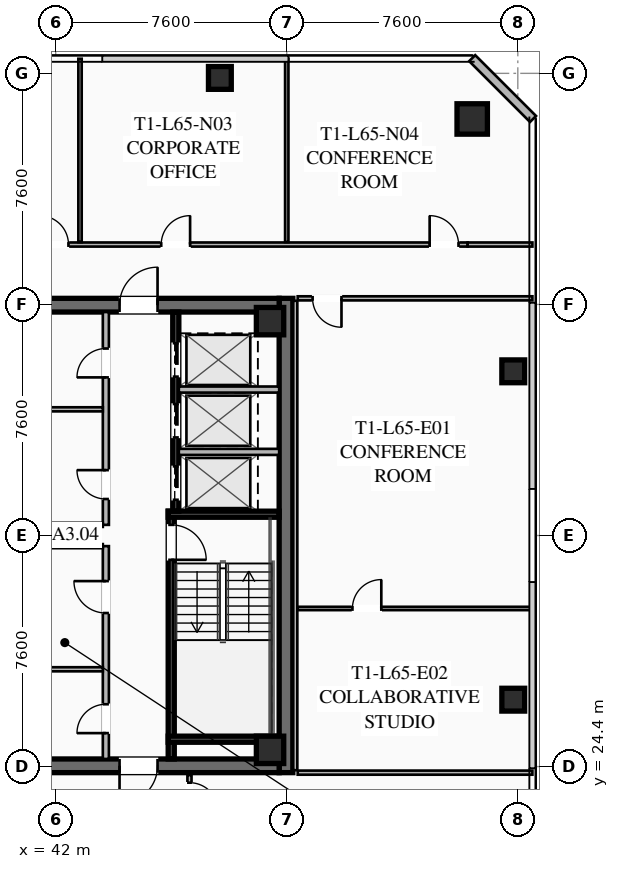
"""IFC4 building model, lengths in metres.
Left out: names, types, materials, properties, quantities, classifications, styles, units other than length and angle.
Written with IfcOpenShell. Run it as: python <this file> out.ifc"""

import sys

from ifc_helpers import new_model, si_unit, direction, frame, frame_2d, origin, origin_2d, place, context, subcontext, project, spatial, rectangle, hollow_rectangle, extrude, element, fill, save


model = new_model("IFC4")
c1 = context("Model", 3, precision=1e-05, world=origin(), true_north=direction((0.0, 1.0)))
c2 = subcontext(c1, "Body", "Model", "MODEL_VIEW")
j1 = project(units=[si_unit("LENGTHUNIT", "METRE"), si_unit("PLANEANGLEUNIT", "RADIAN")], contexts=[c1])
p1 = place(None, origin())
s1 = spatial("IfcSite", under=j1, at=p1, CompositionType="ELEMENT")
p2 = place(p1, origin())
s2 = spatial("IfcBuilding", under=s1, at=p2, CompositionType="ELEMENT")
p3 = place(p2, frame((0.0, 0.0, 239.7)))
s3 = spatial("IfcBuildingStorey", under=s2, at=p3, CompositionType="ELEMENT", Elevation=239.7)
p4 = place(p3, frame((49.575, 39.8, 0.0), z_axis=(0.0, 0.0, 1.0), x_axis=(0.0, -1.0, 0.0)))
e1 = element("IfcWall", 1, at=p4, inside=s3, PredefinedType="SHEAR", context=c2, shape_type="SweptSolid", body=[
    extrude(rectangle(XDim=15.6, YDim=0.45, at=frame_2d((7.8, 0.0))), origin(), (0.0, 0.0, 1.0), 3.55),
])
p5 = place(p3, frame((49.35, 24.425, 0.0), z_axis=(0.0, 0.0, 1.0), x_axis=(-1.0, 0.0, 0.0)))
e2 = element("IfcWall", 2, at=p5, inside=s3, PredefinedType="SHEAR", context=c2, shape_type="SweptSolid", body=[
    extrude(rectangle(XDim=14.7, YDim=0.45, at=frame_2d((7.35, 0.0))), origin(), (0.0, 0.0, 1.0), 3.55),
])
p6 = place(p5, frame((9.05, 0.0, 0.0)))
e3 = element("IfcOpeningElement", 3, at=p6, cuts=e2, PredefinedType="OPENING", context=c2, shape_type="SweptSolid", body=[
    extrude(rectangle(XDim=1.25, YDim=2.25, at=frame_2d((0.625, 1.125))), frame((0.0, 0.235, 0.0), z_axis=(0.0, -1.0, 0.0), x_axis=(1.0, 0.0, 0.0)), (0.0, 0.0, 1.0), 0.47),
])
p7 = place(p5, frame((4.0, 0.0, 0.0)))
e4 = element("IfcOpeningElement", 4, at=p7, cuts=e2, PredefinedType="OPENING", context=c2, shape_type="SweptSolid", body=[
    extrude(rectangle(XDim=1.25, YDim=2.25, at=frame_2d((0.625, 1.125))), frame((0.0, 0.235, 0.0), z_axis=(0.0, -1.0, 0.0), x_axis=(1.0, 0.0, 0.0)), (0.0, 0.0, 1.0), 0.47),
])
p8 = place(p3, frame((34.65, 39.575, 0.0), z_axis=(0.0, 0.0, 1.0), x_axis=(1.0, 0.0, 0.0)))
e5 = element("IfcWall", 5, at=p8, inside=s3, PredefinedType="SHEAR", context=c2, shape_type="SweptSolid", body=[
    extrude(rectangle(XDim=14.7, YDim=0.45, at=frame_2d((7.35, 0.0))), origin(), (0.0, 0.0, 1.0), 3.55),
])
p9 = place(p8, frame((4.4, 0.0, 0.0)))
e6 = element("IfcOpeningElement", 6, at=p9, cuts=e5, PredefinedType="OPENING", context=c2, shape_type="SweptSolid", body=[
    extrude(rectangle(XDim=1.25, YDim=2.25, at=frame_2d((0.625, 1.125))), frame((0.0, 0.235, 0.0), z_axis=(0.0, -1.0, 0.0), x_axis=(1.0, 0.0, 0.0)), (0.0, 0.0, 1.0), 0.47),
])
p10 = place(p8, frame((9.45, 0.0, 0.0)))
e7 = element("IfcOpeningElement", 7, at=p10, cuts=e5, PredefinedType="OPENING", context=c2, shape_type="SweptSolid", body=[
    extrude(rectangle(XDim=1.25, YDim=2.25, at=frame_2d((0.625, 1.125))), frame((0.0, 0.235, 0.0), z_axis=(0.0, -1.0, 0.0), x_axis=(1.0, 0.0, 0.0)), (0.0, 0.0, 1.0), 0.47),
])
for number, where, z_axis, x_axis in (
    (8, (49.05, 24.95, 0.0), (0.0, 0.0, 1.0), (1.0, 0.0, 0.0)),
    (9, (49.05, 39.05, 0.0), (0.0, 0.0, 1.0), (1.0, 0.0, 0.0)),
):
    element("IfcColumn", number, at=place(p3, frame(where, z_axis=z_axis, x_axis=x_axis)), inside=s3, PredefinedType="COLUMN", context=c2, shape_type="SweptSolid", body=[
        extrude(hollow_rectangle(XDim=0.9, YDim=0.9, WallThickness=0.04, at=origin_2d()), origin(), (0.0, 0.0, 1.0), 3.37),
    ])
p11 = place(p3, frame((55.7, 45.7, 0.0), z_axis=(0.0, 0.0, 1.0), x_axis=(1.0, 0.0, 0.0)))
e10 = element("IfcColumn", 10, at=p11, inside=s3, PredefinedType="COLUMN", context=c2, shape_type="SweptSolid", body=[
    extrude(hollow_rectangle(XDim=1.0, YDim=1.0, WallThickness=0.04, at=origin_2d()), origin(), (0.0, 0.0, 1.0), 3.37),
])
for number, where, z_axis, x_axis in (
    (11, (57.05, 26.6, 0.0), (0.0, 0.0, 1.0), (1.0, 0.0, 0.0)),
    (12, (57.05, 37.4, 0.0), (0.0, 0.0, 1.0), (1.0, 0.0, 0.0)),
    (13, (47.4, 47.05, 0.0), (0.0, 0.0, 1.0), (1.0, 0.0, 0.0)),
):
    element("IfcColumn", number, at=place(p3, frame(where, z_axis=z_axis, x_axis=x_axis)), inside=s3, PredefinedType="COLUMN", context=c2, shape_type="SweptSolid", body=[
        extrude(hollow_rectangle(XDim=0.75, YDim=0.75, WallThickness=0.032, at=origin_2d()), origin(), (0.0, 0.0, 1.0), 3.37),
    ])
p12 = place(p3, frame((55.7, 47.7, 0.0), z_axis=(0.0, 0.0, 1.0), x_axis=(0.707106781187, -0.707106781187, 0.0)))
e14 = element("IfcWall", 14, at=p12, inside=s3, PredefinedType="SOLIDWALL", context=c2, shape_type="SweptSolid", body=[
    extrude(rectangle(XDim=2.828, YDim=0.28, at=frame_2d((1.414, 0.0))), origin(), (0.0, 0.0, 1.0), 3.37),
])
p13 = place(p3, frame((45.8, 32.8, 0.0), z_axis=(0.0, 0.0, 1.0), x_axis=(0.0, -1.0, 0.0)))
e15 = element("IfcWall", 15, at=p13, inside=s3, PredefinedType="SHEAR", context=c2, shape_type="SweptSolid", body=[
    extrude(rectangle(XDim=8.15, YDim=0.2, at=frame_2d((4.075, 0.0))), origin(), (0.0, 0.0, 1.0), 3.37),
])
p14 = place(p13, frame((0.45, 0.0, 0.0)))
e16 = element("IfcOpeningElement", 16, at=p14, cuts=e15, PredefinedType="OPENING", context=c2, shape_type="SweptSolid", body=[
    extrude(rectangle(XDim=1.15, YDim=2.2, at=frame_2d((0.575, 1.1))), frame((0.0, 0.11, 0.0), z_axis=(0.0, -1.0, 0.0), x_axis=(1.0, 0.0, 0.0)), (0.0, 0.0, 1.0), 0.22),
])
for number, where, z_axis, x_axis in (
    (17, (45.7, 32.7, 0.0), (0.0, 0.0, 1.0), (1.0, 0.0, 0.0)),
    (18, (45.7, 25.3, 0.0), (0.0, 0.0, 1.0), (1.0, 0.0, 0.0)),
):
    element("IfcWall", number, at=place(p3, frame(where, z_axis=z_axis, x_axis=x_axis)), inside=s3, PredefinedType="SHEAR", context=c2, shape_type="SweptSolid", body=[
        extrude(rectangle(XDim=3.65, YDim=0.2, at=frame_2d((1.825, 0.0))), origin(), (0.0, 0.0, 1.0), 3.37),
    ])
p15 = place(p3, frame((45.95, 39.35, 0.0), z_axis=(0.0, 0.0, 1.0), x_axis=(0.0, -1.0, 0.0)))
e19 = element("IfcWall", 19, at=p15, inside=s3, PredefinedType="SHEAR", context=c2, shape_type="SweptSolid", body=[
    extrude(rectangle(XDim=6.55, YDim=0.2, at=frame_2d((3.275, 0.0))), origin(), (0.0, 0.0, 1.0), 3.37),
])
p16 = place(p15, frame((5.075, 0.0, 0.0)))
e20 = element("IfcOpeningElement", 20, at=p16, cuts=e19, PredefinedType="OPENING", context=c2, shape_type="SweptSolid", body=[
    extrude(rectangle(XDim=1.1, YDim=2.2, at=frame_2d((0.55, 1.1))), frame((0.0, 0.11, 0.0), z_axis=(0.0, -1.0, 0.0), x_axis=(1.0, 0.0, 0.0)), (0.0, 0.0, 1.0), 0.22),
])
p17 = place(p15, frame((3.025, 0.0, 0.0)))
e21 = element("IfcOpeningElement", 21, at=p17, cuts=e19, PredefinedType="OPENING", context=c2, shape_type="SweptSolid", body=[
    extrude(rectangle(XDim=1.1, YDim=2.2, at=frame_2d((0.55, 1.1))), frame((0.0, 0.11, 0.0), z_axis=(0.0, -1.0, 0.0), x_axis=(1.0, 0.0, 0.0)), (0.0, 0.0, 1.0), 0.22),
])
p18 = place(p15, frame((1.025, 0.0, 0.0)))
e22 = element("IfcOpeningElement", 22, at=p18, cuts=e19, PredefinedType="OPENING", context=c2, shape_type="SweptSolid", body=[
    extrude(rectangle(XDim=1.1, YDim=2.2, at=frame_2d((0.55, 1.1))), frame((0.0, 0.11, 0.0), z_axis=(0.0, -1.0, 0.0), x_axis=(1.0, 0.0, 0.0)), (0.0, 0.0, 1.0), 0.22),
])
for number, where, z_axis, x_axis in (
    (23, (46.05, 34.75, 0.0), (0.0, 0.0, 1.0), (1.0, 0.0, 0.0)),
    (24, (46.05, 36.8, 0.0), (0.0, 0.0, 1.0), (1.0, 0.0, 0.0)),
):
    element("IfcWall", number, at=place(p3, frame(where, z_axis=z_axis, x_axis=x_axis)), inside=s3, PredefinedType="SOLIDWALL", context=c2, shape_type="SweptSolid", body=[
        extrude(rectangle(XDim=3.3, YDim=0.2, at=frame_2d((1.65, 0.0))), origin(), (0.0, 0.0, 1.0), 3.37),
    ])
p19 = place(p3, frame((43.65, 24.65, 0.0), z_axis=(0.0, 0.0, 1.0), x_axis=(0.0, 1.0, 0.0)))
e25 = element("IfcWall", 25, at=p19, inside=s3, PredefinedType="SOLIDWALL", context=c2, shape_type="SweptSolid", body=[
    extrude(rectangle(XDim=7.0, YDim=0.2, at=frame_2d((3.5, 0.0))), origin(), (0.0, 0.0, 1.0), 2.723),
])
p20 = place(p19, frame((0.85, 0.0, 0.0)))
e26 = element("IfcOpeningElement", 26, at=p20, cuts=e25, PredefinedType="OPENING", context=c2, shape_type="SweptSolid", body=[
    extrude(rectangle(XDim=0.95, YDim=2.05, at=frame_2d((0.475, 1.025))), frame((0.0, 0.11, 0.0), z_axis=(0.0, -1.0, 0.0), x_axis=(1.0, 0.0, 0.0)), (0.0, 0.0, 1.0), 0.22),
])
p21 = place(p19, frame((4.8, 0.0, 0.0)))
e27 = element("IfcOpeningElement", 27, at=p21, cuts=e25, PredefinedType="OPENING", context=c2, shape_type="SweptSolid", body=[
    extrude(rectangle(XDim=1.05, YDim=2.2, at=frame_2d((0.525, 1.1))), frame((0.0, 0.11, 0.0), z_axis=(0.0, -1.0, 0.0), x_axis=(1.0, 0.0, 0.0)), (0.0, 0.0, 1.0), 0.22),
])
for number, where, z_axis, x_axis in (
    (28, (41.67, 31.65, 0.0), (0.0, 0.0, 1.0), (1.0, 0.0, 0.0)),
    (29, (41.67, 27.6, 0.0), (0.0, 0.0, 1.0), (1.0, 0.0, 0.0)),
):
    element("IfcWall", number, at=place(p3, frame(where, z_axis=z_axis, x_axis=x_axis)), inside=s3, PredefinedType="PARTITIONING", context=c2, shape_type="SweptSolid", body=[
        extrude(rectangle(XDim=1.88, YDim=0.135, at=frame_2d((0.94, 0.0))), origin(), (0.0, 0.0, 1.0), 2.723),
    ])
p22 = place(p3, frame((43.65, 32.35, 0.0), z_axis=(0.0, 0.0, 1.0), x_axis=(0.0, 1.0, 0.0)))
e30 = element("IfcWall", 30, at=p22, inside=s3, PredefinedType="SOLIDWALL", context=c2, shape_type="SweptSolid", body=[
    extrude(rectangle(XDim=7.0, YDim=0.2, at=frame_2d((3.5, 0.0))), origin(), (0.0, 0.0, 1.0), 2.723),
])
p23 = place(p22, frame((0.85, 0.0, 0.0)))
e31 = element("IfcOpeningElement", 31, at=p23, cuts=e30, PredefinedType="OPENING", context=c2, shape_type="SweptSolid", body=[
    extrude(rectangle(XDim=0.95, YDim=2.05, at=frame_2d((0.475, 1.025))), frame((0.0, 0.11, 0.0), z_axis=(0.0, -1.0, 0.0), x_axis=(1.0, 0.0, 0.0)), (0.0, 0.0, 1.0), 0.22),
])
p24 = place(p22, frame((4.85, 0.0, 0.0)))
e32 = element("IfcOpeningElement", 32, at=p24, cuts=e30, PredefinedType="OPENING", context=c2, shape_type="SweptSolid", body=[
    extrude(rectangle(XDim=0.95, YDim=2.05, at=frame_2d((0.475, 1.025))), frame((0.0, 0.11, 0.0), z_axis=(0.0, -1.0, 0.0), x_axis=(1.0, 0.0, 0.0)), (0.0, 0.0, 1.0), 0.22),
])
for number, where, z_axis, x_axis in (
    (33, (41.67, 32.35, 0.0), (0.0, 0.0, 1.0), (1.0, 0.0, 0.0)),
    (34, (41.67, 36.15, 0.0), (0.0, 0.0, 1.0), (1.0, 0.0, 0.0)),
):
    element("IfcWall", number, at=place(p3, frame(where, z_axis=z_axis, x_axis=x_axis)), inside=s3, PredefinedType="PARTITIONING", context=c2, shape_type="SweptSolid", body=[
        extrude(rectangle(XDim=1.88, YDim=0.135, at=frame_2d((0.94, 0.0))), origin(), (0.0, 0.0, 1.0), 2.723),
    ])
p25 = place(p3, frame((28.45, 41.57, 0.0), z_axis=(0.0, 0.0, 1.0), x_axis=(1.0, 0.0, 0.0)))
e35 = element("IfcWall", 35, at=p25, inside=s3, PredefinedType="PARTITIONING", context=c2, shape_type="SweptSolid", body=[
    extrude(rectangle(XDim=27.1, YDim=0.135, at=frame_2d((13.55, 0.0))), origin(), (0.0, 0.0, 1.0), 2.723),
])
p26 = place(p25, frame((0.3, 0.0, 0.0)))
e36 = element("IfcOpeningElement", 36, at=p26, cuts=e35, PredefinedType="OPENING", context=c2, shape_type="SweptSolid", body=[
    extrude(rectangle(XDim=0.95, YDim=2.05, at=frame_2d((0.475, 1.025))), frame((0.0, 0.077, 0.0), z_axis=(0.0, -1.0, 0.0), x_axis=(1.0, 0.0, 0.0)), (0.0, 0.0, 1.0), 0.155),
])
p27 = place(p25, frame((13.02, 0.0, 0.0)))
e37 = element("IfcOpeningElement", 37, at=p27, cuts=e35, PredefinedType="OPENING", context=c2, shape_type="SweptSolid", body=[
    extrude(rectangle(XDim=0.95, YDim=2.05, at=frame_2d((0.475, 1.025))), frame((0.0, 0.077, 0.0), z_axis=(0.0, -1.0, 0.0), x_axis=(1.0, 0.0, 0.0)), (0.0, 0.0, 1.0), 0.155),
])
p28 = place(p25, frame((17.021, 0.0, 0.0)))
e38 = element("IfcOpeningElement", 38, at=p28, cuts=e35, PredefinedType="OPENING", context=c2, shape_type="SweptSolid", body=[
    extrude(rectangle(XDim=0.95, YDim=2.05, at=frame_2d((0.475, 1.025))), frame((0.0, 0.077, 0.0), z_axis=(0.0, -1.0, 0.0), x_axis=(1.0, 0.0, 0.0)), (0.0, 0.0, 1.0), 0.155),
])
p29 = place(p25, frame((25.85, 0.0, 0.0)))
e39 = element("IfcOpeningElement", 39, at=p29, cuts=e35, PredefinedType="OPENING", context=c2, shape_type="SweptSolid", body=[
    extrude(rectangle(XDim=0.95, YDim=2.05, at=frame_2d((0.475, 1.025))), frame((0.0, 0.077, 0.0), z_axis=(0.0, -1.0, 0.0), x_axis=(1.0, 0.0, 0.0)), (0.0, 0.0, 1.0), 0.155),
])
p30 = place(p3, frame((55.55, 41.57, 0.0), z_axis=(0.0, 0.0, 1.0), x_axis=(1.0, 0.0, 0.0)))
e40 = element("IfcWall", 40, at=p30, inside=s3, PredefinedType="PARTITIONING", context=c2, shape_type="SweptSolid", body=[
    extrude(rectangle(XDim=2.13, YDim=0.135, at=frame_2d((1.065, 0.0))), origin(), (0.0, 0.0, 1.0), 2.723),
])
for number, where, z_axis, x_axis in (
    (41, (42.8, 41.65, 0.0), (0.0, 0.0, 1.0), (0.0, 1.0, 0.0)),
    (42, (49.6, 41.65, 0.0), (0.0, 0.0, 1.0), (0.0, 1.0, 0.0)),
):
    element("IfcWall", number, at=place(p3, frame(where, z_axis=z_axis, x_axis=x_axis)), inside=s3, PredefinedType="PARTITIONING", context=c2, shape_type="SweptSolid", body=[
        extrude(rectangle(XDim=6.03, YDim=0.11, at=frame_2d((3.015, 0.0))), origin(), (0.0, 0.0, 1.0), 2.723),
    ])
p31 = place(p3, frame((46.4, 24.12, 0.0), z_axis=(0.0, 0.0, 1.0), x_axis=(0.0, -1.0, 0.0)))
e43 = element("IfcWall", 43, at=p31, inside=s3, PredefinedType="PARTITIONING", context=c2, shape_type="SweptSolid", body=[
    extrude(rectangle(XDim=2.24, YDim=0.135, at=frame_2d((1.12, 0.0))), origin(), (0.0, 0.0, 1.0), 2.723),
])
p32 = place(p31, frame((0.25, 0.0, 0.0)))
e44 = element("IfcOpeningElement", 44, at=p32, cuts=e43, PredefinedType="OPENING", context=c2, shape_type="SweptSolid", body=[
    extrude(rectangle(XDim=0.95, YDim=2.05, at=frame_2d((0.475, 1.025))), frame((0.0, 0.077, 0.0), z_axis=(0.0, -1.0, 0.0), x_axis=(1.0, 0.0, 0.0)), (0.0, 0.0, 1.0), 0.155),
])
p33 = place(p3, frame((49.88, 39.72, 0.0), z_axis=(0.0, 0.0, 1.0), x_axis=(0.0, -1.0, 0.0)))
e45 = element("IfcWall", 45, at=p33, inside=s3, PredefinedType="PARTITIONING", context=c2, shape_type="SweptSolid", body=[
    extrude(rectangle(XDim=15.44, YDim=0.135, at=frame_2d((7.72, 0.0))), origin(), (0.0, 0.0, 1.0), 2.723),
])
p34 = place(p3, frame((57.68, 39.8, 0.0), z_axis=(0.0, 0.0, 1.0), x_axis=(-1.0, 0.0, 0.0)))
e46 = element("IfcWall", 46, at=p34, inside=s3, PredefinedType="PARTITIONING", context=c2, shape_type="SweptSolid", body=[
    extrude(rectangle(XDim=7.72, YDim=0.135, at=frame_2d((3.86, 0.0))), origin(), (0.0, 0.0, 1.0), 2.723),
])
p35 = place(p34, frame((6.28, 0.0, 0.0)))
e47 = element("IfcOpeningElement", 47, at=p35, cuts=e46, PredefinedType="OPENING", context=c2, shape_type="SweptSolid", body=[
    extrude(rectangle(XDim=0.95, YDim=2.05, at=frame_2d((0.475, 1.025))), frame((0.0, 0.077, 0.0), z_axis=(0.0, -1.0, 0.0), x_axis=(1.0, 0.0, 0.0)), (0.0, 0.0, 1.0), 0.155),
])
p36 = place(p3, frame((49.96, 24.2, 0.0), z_axis=(0.0, 0.0, 1.0), x_axis=(1.0, 0.0, 0.0)))
e48 = element("IfcWall", 48, at=p36, inside=s3, PredefinedType="PARTITIONING", context=c2, shape_type="SweptSolid", body=[
    extrude(rectangle(XDim=7.72, YDim=0.135, at=frame_2d((3.86, 0.0))), origin(), (0.0, 0.0, 1.0), 2.723),
])
p37 = place(p3, frame((49.96, 29.6, 0.0), z_axis=(0.0, 0.0, 1.0), x_axis=(1.0, 0.0, 0.0)))
e49 = element("IfcWall", 49, at=p37, inside=s3, PredefinedType="PARTITIONING", context=c2, shape_type="SweptSolid", body=[
    extrude(rectangle(XDim=7.72, YDim=0.11, at=frame_2d((3.86, 0.0))), origin(), (0.0, 0.0, 1.0), 2.723),
])
p38 = place(p37, frame((1.8, 0.0, 0.0)))
e50 = element("IfcOpeningElement", 50, at=p38, cuts=e49, PredefinedType="OPENING", context=c2, shape_type="SweptSolid", body=[
    extrude(rectangle(XDim=0.95, YDim=2.05, at=frame_2d((0.475, 1.025))), frame((0.0, 0.065, 0.0), z_axis=(0.0, -1.0, 0.0), x_axis=(1.0, 0.0, 0.0)), (0.0, 0.0, 1.0), 0.13),
])
p39 = place(p10, origin())
e51 = element("IfcDoor", 51, at=p39, inside=s3, OperationType="SINGLE_SWING_RIGHT", PredefinedType="DOOR", context=c2, shape_type="SweptSolid", body=[
    extrude(rectangle(XDim=1.25, YDim=2.25, at=frame_2d((0.625, 1.125))), frame((0.0, 0.025, 0.0), z_axis=(0.0, -1.0, 0.0), x_axis=(1.0, 0.0, 0.0)), (0.0, 0.0, 1.0), 0.05),
])
fill(e7, e51)
p40 = place(p7, origin())
e52 = element("IfcDoor", 52, at=p40, inside=s3, OperationType="SINGLE_SWING_RIGHT", PredefinedType="DOOR", context=c2, shape_type="SweptSolid", body=[
    extrude(rectangle(XDim=1.25, YDim=2.25, at=frame_2d((0.625, 1.125))), frame((0.0, 0.025, 0.0), z_axis=(0.0, -1.0, 0.0), x_axis=(1.0, 0.0, 0.0)), (0.0, 0.0, 1.0), 0.05),
])
fill(e4, e52)
p41 = place(p14, origin())
e53 = element("IfcDoor", 53, at=p41, inside=s3, OperationType="SINGLE_SWING_RIGHT", PredefinedType="DOOR", context=c2, shape_type="SweptSolid", body=[
    extrude(rectangle(XDim=1.15, YDim=2.2, at=frame_2d((0.575, 1.1))), frame((0.0, 0.025, 0.0), z_axis=(0.0, -1.0, 0.0), x_axis=(1.0, 0.0, 0.0)), (0.0, 0.0, 1.0), 0.05),
])
fill(e16, e53)
p42 = place(p20, origin())
e54 = element("IfcDoor", 54, at=p42, inside=s3, OperationType="SINGLE_SWING_LEFT", PredefinedType="DOOR", context=c2, shape_type="SweptSolid", body=[
    extrude(rectangle(XDim=0.95, YDim=2.05, at=frame_2d((0.475, 1.025))), frame((0.0, 0.025, 0.0), z_axis=(0.0, -1.0, 0.0), x_axis=(1.0, 0.0, 0.0)), (0.0, 0.0, 1.0), 0.05),
])
fill(e26, e54)
p43 = place(p21, origin())
e55 = element("IfcDoor", 55, at=p43, inside=s3, OperationType="SINGLE_SWING_RIGHT", PredefinedType="DOOR", context=c2, shape_type="SweptSolid", body=[
    extrude(rectangle(XDim=1.05, YDim=2.2, at=frame_2d((0.525, 1.1))), frame((0.0, 0.025, 0.0), z_axis=(0.0, -1.0, 0.0), x_axis=(1.0, 0.0, 0.0)), (0.0, 0.0, 1.0), 0.05),
])
fill(e27, e55)
p44 = place(p23, origin())
e56 = element("IfcDoor", 56, at=p44, inside=s3, OperationType="SINGLE_SWING_RIGHT", PredefinedType="DOOR", context=c2, shape_type="SweptSolid", body=[
    extrude(rectangle(XDim=0.95, YDim=2.05, at=frame_2d((0.475, 1.025))), frame((0.0, 0.025, 0.0), z_axis=(0.0, -1.0, 0.0), x_axis=(1.0, 0.0, 0.0)), (0.0, 0.0, 1.0), 0.05),
])
fill(e31, e56)
p45 = place(p24, origin())
e57 = element("IfcDoor", 57, at=p45, inside=s3, OperationType="SINGLE_SWING_LEFT", PredefinedType="DOOR", context=c2, shape_type="SweptSolid", body=[
    extrude(rectangle(XDim=0.95, YDim=2.05, at=frame_2d((0.475, 1.025))), frame((0.0, 0.025, 0.0), z_axis=(0.0, -1.0, 0.0), x_axis=(1.0, 0.0, 0.0)), (0.0, 0.0, 1.0), 0.05),
])
fill(e32, e57)
p46 = place(p27, origin())
e58 = element("IfcDoor", 58, at=p46, inside=s3, OperationType="SINGLE_SWING_LEFT", PredefinedType="DOOR", context=c2, shape_type="SweptSolid", body=[
    extrude(rectangle(XDim=0.95, YDim=2.05, at=frame_2d((0.475, 1.025))), frame((0.0, 0.025, 0.0), z_axis=(0.0, -1.0, 0.0), x_axis=(1.0, 0.0, 0.0)), (0.0, 0.0, 1.0), 0.05),
])
fill(e37, e58)
p47 = place(p28, origin())
e59 = element("IfcDoor", 59, at=p47, inside=s3, OperationType="SINGLE_SWING_RIGHT", PredefinedType="DOOR", context=c2, shape_type="SweptSolid", body=[
    extrude(rectangle(XDim=0.95, YDim=2.05, at=frame_2d((0.475, 1.025))), frame((0.0, 0.025, 0.0), z_axis=(0.0, -1.0, 0.0), x_axis=(1.0, 0.0, 0.0)), (0.0, 0.0, 1.0), 0.05),
])
fill(e38, e59)
p48 = place(p29, origin())
e60 = element("IfcDoor", 60, at=p48, inside=s3, OperationType="SINGLE_SWING_LEFT", PredefinedType="DOOR", context=c2, shape_type="SweptSolid", body=[
    extrude(rectangle(XDim=0.95, YDim=2.05, at=frame_2d((0.475, 1.025))), frame((0.0, 0.025, 0.0), z_axis=(0.0, -1.0, 0.0), x_axis=(1.0, 0.0, 0.0)), (0.0, 0.0, 1.0), 0.05),
])
fill(e39, e60)
p49 = place(p32, origin())
e61 = element("IfcDoor", 61, at=p49, inside=s3, OperationType="SINGLE_SWING_RIGHT", PredefinedType="DOOR", context=c2, shape_type="SweptSolid", body=[
    extrude(rectangle(XDim=0.95, YDim=2.05, at=frame_2d((0.475, 1.025))), frame((0.0, 0.025, 0.0), z_axis=(0.0, -1.0, 0.0), x_axis=(1.0, 0.0, 0.0)), (0.0, 0.0, 1.0), 0.05),
])
fill(e44, e61)
p50 = place(p35, origin())
e62 = element("IfcDoor", 62, at=p50, inside=s3, OperationType="SINGLE_SWING_LEFT", PredefinedType="DOOR", context=c2, shape_type="SweptSolid", body=[
    extrude(rectangle(XDim=0.95, YDim=2.05, at=frame_2d((0.475, 1.025))), frame((0.0, 0.025, 0.0), z_axis=(0.0, -1.0, 0.0), x_axis=(1.0, 0.0, 0.0)), (0.0, 0.0, 1.0), 0.05),
])
fill(e47, e62)
p51 = place(p38, origin())
e63 = element("IfcDoor", 63, at=p51, inside=s3, OperationType="SINGLE_SWING_RIGHT", PredefinedType="DOOR", context=c2, shape_type="SweptSolid", body=[
    extrude(rectangle(XDim=0.95, YDim=2.05, at=frame_2d((0.475, 1.025))), frame((0.0, 0.025, 0.0), z_axis=(0.0, -1.0, 0.0), x_axis=(1.0, 0.0, 0.0)), (0.0, 0.0, 1.0), 0.05),
])
fill(e50, e63)
p52 = place(p16, origin())
e64 = element("IfcDoor", 64, at=p52, inside=s3, OperationType="SLIDING_TO_LEFT", PredefinedType="DOOR", context=c2, shape_type="SweptSolid", body=[
    extrude(rectangle(XDim=1.1, YDim=2.2, at=frame_2d((0.55, 1.1))), frame((0.0, 0.025, 0.0), z_axis=(0.0, -1.0, 0.0), x_axis=(1.0, 0.0, 0.0)), (0.0, 0.0, 1.0), 0.05),
])
fill(e20, e64)
p53 = place(p17, origin())
e65 = element("IfcDoor", 65, at=p53, inside=s3, OperationType="SLIDING_TO_LEFT", PredefinedType="DOOR", context=c2, shape_type="SweptSolid", body=[
    extrude(rectangle(XDim=1.1, YDim=2.2, at=frame_2d((0.55, 1.1))), frame((0.0, 0.025, 0.0), z_axis=(0.0, -1.0, 0.0), x_axis=(1.0, 0.0, 0.0)), (0.0, 0.0, 1.0), 0.05),
])
fill(e21, e65)
p54 = place(p18, origin())
e66 = element("IfcDoor", 66, at=p54, inside=s3, OperationType="SLIDING_TO_LEFT", PredefinedType="DOOR", context=c2, shape_type="SweptSolid", body=[
    extrude(rectangle(XDim=1.1, YDim=2.2, at=frame_2d((0.55, 1.1))), frame((0.0, 0.025, 0.0), z_axis=(0.0, -1.0, 0.0), x_axis=(1.0, 0.0, 0.0)), (0.0, 0.0, 1.0), 0.05),
])
fill(e22, e66)
save(model, sys.argv[1])
